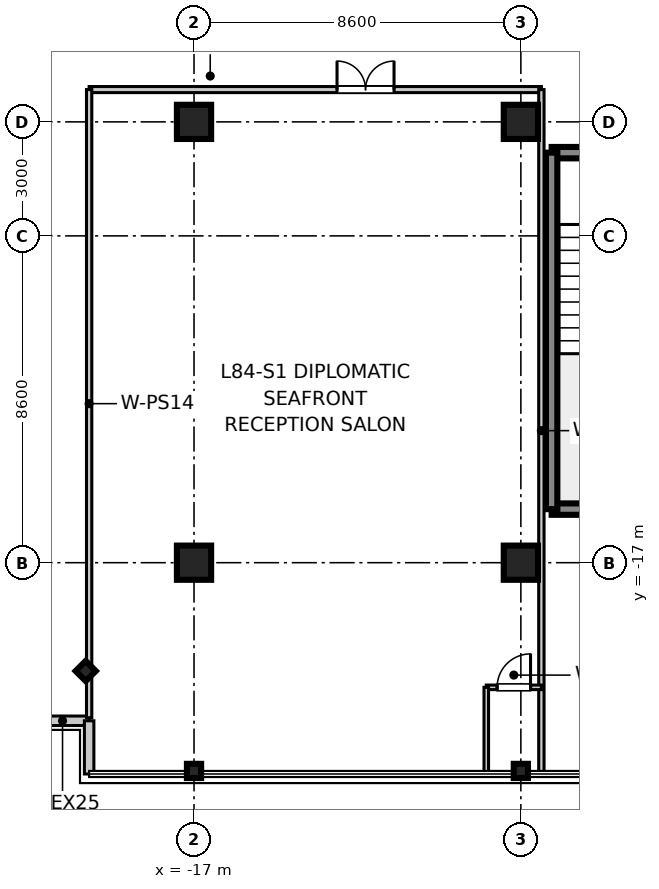
"""IFC4 building model, lengths in metres.
Left out: names, types, materials, properties, quantities, classifications, styles, units other than length and angle.
Written with IfcOpenShell. Run it as: python <this file> out.ifc"""

import sys

from ifc_helpers import new_model, si_unit, direction, frame, frame_2d, origin, origin_2d, place, context, subcontext, project, spatial, rectangle, i_section, extrude, source, transform, mapped, element, fill, save


model = new_model("IFC4")
c1 = context("Model", 3, precision=1e-05, world=origin(), true_north=direction((0.0, 1.0)))
c2 = subcontext(c1, "Body", "Model", "MODEL_VIEW")
j1 = project(units=[si_unit("LENGTHUNIT", "METRE"), si_unit("PLANEANGLEUNIT", "RADIAN")], contexts=[c1])
p1 = place(None, origin())
s1 = spatial("IfcSite", under=j1, at=p1, CompositionType="ELEMENT")
p2 = place(p1, origin())
s2 = spatial("IfcBuilding", under=s1, at=p2, CompositionType="ELEMENT")
p3 = place(p2, frame((0.0, 0.0, 327.15)))
s3 = spatial("IfcBuildingStorey", under=s2, at=p3, CompositionType="ELEMENT", Elevation=327.15)
m1 = source(origin(), c2, "Body", "SweptSolid", [
    extrude(rectangle(XDim=0.9, YDim=0.9, at=origin_2d()), origin(), (0.0, 0.0, 1.0), 3.755),
])
for number, where, z_axis, x_axis in (
    (1, (-17.0, -17.0, 0.0), (0.0, 0.0, 1.0), (1.0, 0.0, 0.0)),
    (2, (-17.0, -5.4, 0.0), (0.0, 0.0, 1.0), (1.0, 0.0, 0.0)),
    (3, (-8.4, -17.0, 0.0), (0.0, 0.0, 1.0), (1.0, 0.0, 0.0)),
    (4, (-8.4, -5.4, 0.0), (0.0, 0.0, 1.0), (1.0, 0.0, 0.0)),
):
    element("IfcColumn", number, at=place(p3, frame(where, z_axis=z_axis, x_axis=x_axis)), inside=s3, PredefinedType="COLUMN", context=c2, shape_type="MappedRepresentation", body=[
        mapped(m1, transform((0.0, 0.0, 0.0), scale=1.0)),
    ])
m2 = source(origin(), c2, "Body", "SweptSolid", [
    extrude(i_section(OverallWidth=0.374, OverallDepth=0.374, WebThickness=0.014, FlangeThickness=0.023, at=origin_2d()), origin(), (0.0, 0.0, 1.0), 3.755),
])
for number, where, z_axis, x_axis in (
    (5, (-17.0, -22.48, 0.0), (0.0, 0.0, 1.0), (0.0, 1.0, 0.0)),
    (6, (-8.4, -22.48, 0.0), (0.0, 0.0, 1.0), (0.0, 1.0, 0.0)),
    (7, (-19.85, -19.85, 0.0), (0.0, 0.0, 1.0), (0.707, 0.707, 0.0)),
):
    element("IfcColumn", number, at=place(p3, frame(where, z_axis=z_axis, x_axis=x_axis)), inside=s3, PredefinedType="COLUMN", context=c2, shape_type="MappedRepresentation", body=[
        mapped(m2, transform((0.0, 0.0, 0.0), scale=1.0)),
    ])
m3 = source(origin(), c2, "Body", "SweptSolid", [
    extrude(rectangle(XDim=3.98, YDim=0.3, at=frame_2d((1.99, 0.0))), origin(), (0.0, 0.0, 1.0), 3.5),
])
p4 = place(p3, frame((-7.59, -15.59, 0.0), z_axis=(0.0, 0.0, 1.0), x_axis=(1.0, 0.0, 0.0)))
e8 = element("IfcWall", 8, at=p4, inside=s3, PredefinedType="SHEAR", context=c2, shape_type="MappedRepresentation", body=[
    mapped(m3, transform((0.0, 0.0, 0.0), scale=1.0)),
])
p5 = place(p3, frame((-7.59, -6.21, 0.0), z_axis=(0.0, 0.0, 1.0), x_axis=(1.0, 0.0, 0.0)))
e9 = element("IfcWall", 9, at=p5, inside=s3, PredefinedType="SHEAR", context=c2, shape_type="MappedRepresentation", body=[
    mapped(m3, transform((0.0, 0.0, 0.0), scale=1.0)),
])
p6 = place(p5, frame((1.44, 0.0, 0.0)))
e10 = element("IfcOpeningElement", 10, at=p6, cuts=e9, PredefinedType="OPENING", context=c2, shape_type="SweptSolid", body=[
    extrude(rectangle(XDim=1.1, YDim=2.15, at=frame_2d((0.55, 1.075))), frame((0.0, 0.16, 0.0), z_axis=(0.0, -1.0, 0.0), x_axis=(1.0, 0.0, 0.0)), (0.0, 0.0, 1.0), 0.32),
])
m4 = source(origin(), c2, "Body", "SweptSolid", [
    extrude(rectangle(XDim=9.38, YDim=0.3, at=frame_2d((4.69, 0.0))), origin(), (0.0, 0.0, 1.0), 3.5),
])
p7 = place(p3, frame((-7.59, -15.59, 0.0), z_axis=(0.0, 0.0, 1.0), x_axis=(0.0, 1.0, 0.0)))
e11 = element("IfcWall", 11, at=p7, inside=s3, PredefinedType="SHEAR", context=c2, shape_type="MappedRepresentation", body=[
    mapped(m4, transform((0.0, 0.0, 0.0), scale=1.0)),
])
m5 = source(origin(), c2, "Body", "SweptSolid", [
    extrude(rectangle(XDim=1.4, YDim=0.25, at=frame_2d((0.7, 0.0))), origin(), (0.0, 0.0, 1.0), 3.5),
])
p8 = place(p3, frame((-21.16, -21.16, 0.0), z_axis=(0.0, 0.0, 1.0), x_axis=(1.0, 0.0, 0.0)))
e12 = element("IfcWall", 12, at=p8, inside=s3, PredefinedType="STANDARD", context=c2, shape_type="MappedRepresentation", body=[
    mapped(m5, transform((0.0, 0.0, 0.0), scale=1.0)),
])
m6 = source(origin(), c2, "Body", "SweptSolid", [
    extrude(rectangle(XDim=1.4, YDim=0.25, at=frame_2d((0.7, 0.0))), origin(), (0.0, 0.0, 1.0), 3.5),
])
p9 = place(p3, frame((-19.76, -22.56, 0.0), z_axis=(0.0, 0.0, 1.0), x_axis=(0.0, 1.0, 0.0)))
e13 = element("IfcWall", 13, at=p9, inside=s3, PredefinedType="STANDARD", context=c2, shape_type="MappedRepresentation", body=[
    mapped(m6, transform((0.0, 0.0, 0.0), scale=1.0)),
])
m7 = source(origin(), c2, "Body", "SweptSolid", [
    extrude(rectangle(XDim=11.9, YDim=0.16, at=frame_2d((5.95, 0.0))), origin(), (0.0, 0.0, 1.0), 2.84),
])
p10 = place(p3, frame((-19.76, -4.55, 0.0), z_axis=(0.0, 0.0, 1.0), x_axis=(1.0, 0.0, 0.0)))
e14 = element("IfcWall", 14, at=p10, inside=s3, PredefinedType="PARTITIONING", context=c2, shape_type="MappedRepresentation", body=[
    mapped(m7, transform((0.0, 0.0, 0.0), scale=1.0)),
])
p11 = place(p10, frame((6.523, 0.0, 0.0)))
e15 = element("IfcOpeningElement", 15, at=p11, cuts=e14, PredefinedType="OPENING", context=c2, shape_type="SweptSolid", body=[
    extrude(rectangle(XDim=1.5, YDim=2.15, at=frame_2d((0.75, 1.075))), frame((0.0, 0.09, 0.0), z_axis=(0.0, -1.0, 0.0), x_axis=(1.0, 0.0, 0.0)), (0.0, 0.0, 1.0), 0.18),
])
m8 = source(origin(), c2, "Body", "SweptSolid", [
    extrude(rectangle(XDim=16.53, YDim=0.14, at=frame_2d((8.265, 0.0))), origin(), (0.0, 0.0, 1.0), 2.84),
])
p12 = place(p3, frame((-19.76, -21.08, 0.0), z_axis=(0.0, 0.0, 1.0), x_axis=(0.0, 1.0, 0.0)))
e16 = element("IfcWall", 16, at=p12, inside=s3, PredefinedType="PARTITIONING", context=c2, shape_type="MappedRepresentation", body=[
    mapped(m8, transform((0.0, 0.0, 0.0), scale=1.0)),
])
m9 = source(origin(), c2, "Body", "SweptSolid", [
    extrude(rectangle(XDim=17.95, YDim=0.14, at=frame_2d((8.975, 0.0))), origin(), (0.0, 0.0, 1.0), 2.84),
])
p13 = place(p3, frame((-7.86, -22.5, 0.0), z_axis=(0.0, 0.0, 1.0), x_axis=(0.0, 1.0, 0.0)))
e17 = element("IfcWall", 17, at=p13, inside=s3, PredefinedType="PARTITIONING", context=c2, shape_type="MappedRepresentation", body=[
    mapped(m9, transform((0.0, 0.0, 0.0), scale=1.0)),
])
m10 = source(origin(), c2, "Body", "SweptSolid", [
    extrude(rectangle(XDim=1.45, YDim=0.12, at=frame_2d((0.725, 0.0))), origin(), (0.0, 0.0, 1.0), 2.84),
])
p14 = place(p3, frame((-9.31, -20.28, 0.0), z_axis=(0.0, 0.0, 1.0), x_axis=(1.0, 0.0, 0.0)))
e18 = element("IfcWall", 18, at=p14, inside=s3, PredefinedType="PARTITIONING", context=c2, shape_type="MappedRepresentation", body=[
    mapped(m10, transform((0.0, 0.0, 0.0), scale=1.0)),
])
p15 = place(p14, frame((0.285, 0.0, 0.0)))
e19 = element("IfcOpeningElement", 19, at=p15, cuts=e18, PredefinedType="OPENING", context=c2, shape_type="SweptSolid", body=[
    extrude(rectangle(XDim=0.88, YDim=2.1, at=frame_2d((0.44, 1.05))), frame((0.0, 0.07, 0.0), z_axis=(0.0, -1.0, 0.0), x_axis=(1.0, 0.0, 0.0)), (0.0, 0.0, 1.0), 0.14),
])
m11 = source(origin(), c2, "Body", "SweptSolid", [
    extrude(rectangle(XDim=2.22, YDim=0.12, at=frame_2d((1.11, 0.0))), origin(), (0.0, 0.0, 1.0), 2.84),
])
p16 = place(p3, frame((-9.31, -22.5, 0.0), z_axis=(0.0, 0.0, 1.0), x_axis=(0.0, 1.0, 0.0)))
e20 = element("IfcWall", 20, at=p16, inside=s3, PredefinedType="PARTITIONING", context=c2, shape_type="MappedRepresentation", body=[
    mapped(m11, transform((0.0, 0.0, 0.0), scale=1.0)),
])
m12 = source(origin(), c2, "Body", "SweptSolid", [
    extrude(rectangle(XDim=0.88, YDim=2.1, at=frame_2d((0.44, 1.05))), frame((0.0, 0.025, 0.0), z_axis=(0.0, -1.0, 0.0), x_axis=(1.0, 0.0, 0.0)), (0.0, 0.0, 1.0), 0.05),
])
p17 = place(p15, frame((0.88, 0.0, 0.0), z_axis=(0.0, 0.0, 1.0), x_axis=(-1.0, 0.0, 0.0)))
e21 = element("IfcDoor", 21, at=p17, inside=s3, OperationType="SINGLE_SWING_RIGHT", PredefinedType="DOOR", context=c2, shape_type="MappedRepresentation", body=[
    mapped(m12, transform((0.0, 0.0, 0.0), scale=1.0)),
])
fill(e19, e21)
m13 = source(origin(), c2, "Body", "SweptSolid", [
    extrude(rectangle(XDim=1.5, YDim=2.15, at=frame_2d((0.75, 1.075))), frame((0.0, 0.025, 0.0), z_axis=(0.0, -1.0, 0.0), x_axis=(1.0, 0.0, 0.0)), (0.0, 0.0, 1.0), 0.05),
])
p18 = place(p11, frame((1.5, 0.0, 0.0), z_axis=(0.0, 0.0, 1.0), x_axis=(-1.0, 0.0, 0.0)))
e22 = element("IfcDoor", 22, at=p18, inside=s3, OperationType="DOUBLE_DOOR_SINGLE_SWING", PredefinedType="DOOR", context=c2, shape_type="MappedRepresentation", body=[
    mapped(m13, transform((0.0, 0.0, 0.0), scale=1.0)),
])
fill(e15, e22)
save(model, sys.argv[1])
